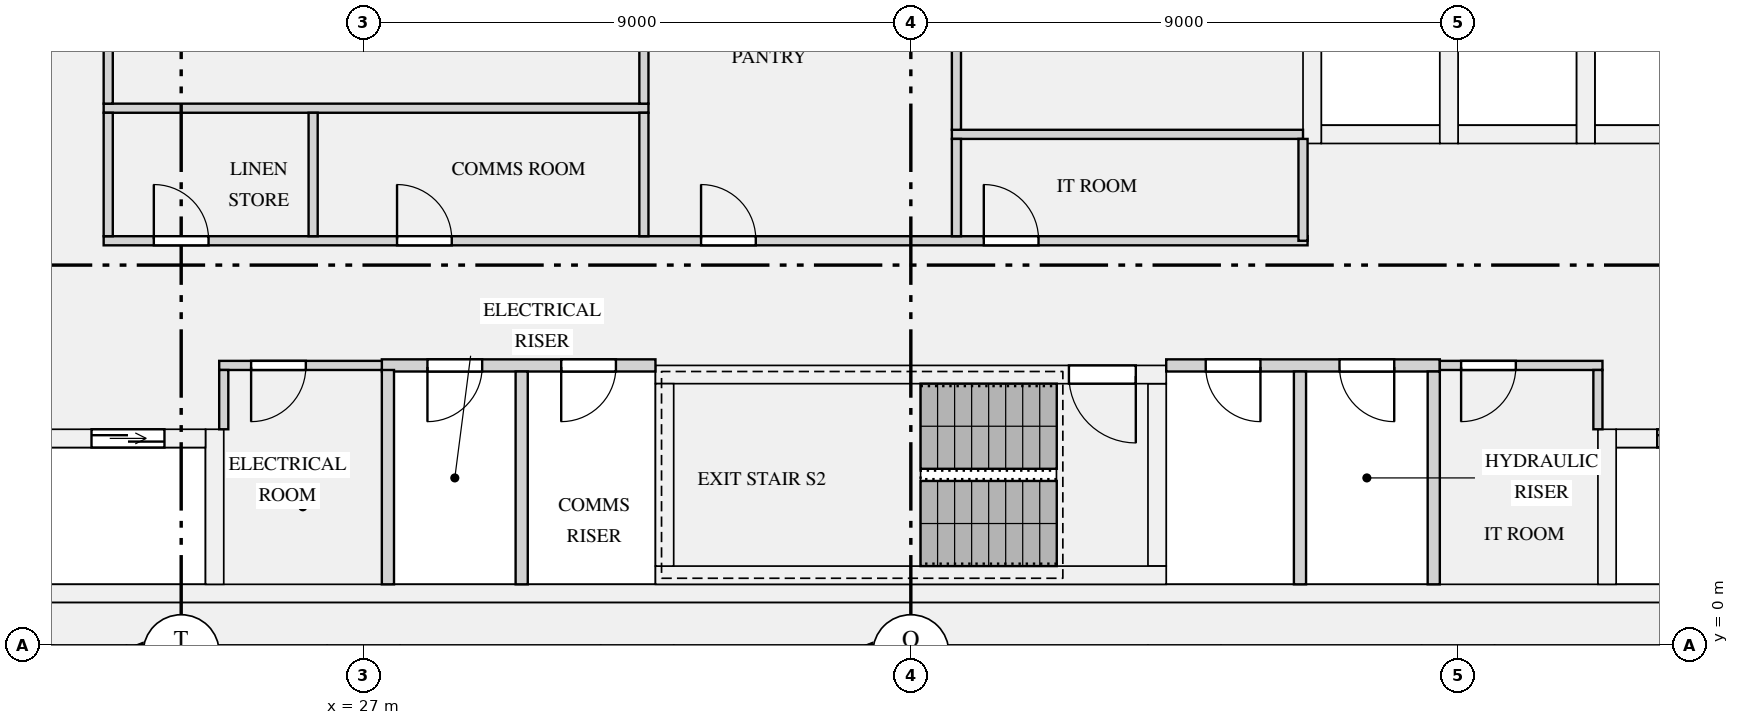
"""IFC4 building model, lengths in metres.
Left out: names, types, materials, properties, quantities, classifications, styles, units other than length and angle.
Written with IfcOpenShell. Run it as: python <this file> out.ifc"""

import sys

from ifc_helpers import new_model, si_unit, direction, frame, frame_2d, origin, place, context, subcontext, project, spatial, rectangle, extrude, element, fill, save


model = new_model("IFC4")
c1 = context("Model", 3, precision=1e-05, world=origin(), true_north=direction((0.0, 1.0)))
c2 = subcontext(c1, "Body", "Model", "MODEL_VIEW")
j1 = project(units=[si_unit("LENGTHUNIT", "METRE"), si_unit("PLANEANGLEUNIT", "RADIAN")], contexts=[c1])
p1 = place(None, origin())
s1 = spatial("IfcSite", under=j1, at=p1, CompositionType="ELEMENT")
p2 = place(p1, origin())
s2 = spatial("IfcBuilding", under=s1, at=p2, CompositionType="ELEMENT")
p3 = place(p2, frame((0.0, 0.0, 150.75)))
s3 = spatial("IfcBuildingStorey", under=s2, at=p3, CompositionType="ELEMENT", Elevation=150.75)
p4 = place(p3, frame((18.7, 0.35, 0.0), z_axis=(0.0, 0.0, 1.0), x_axis=(1.0, 0.0, 0.0)))
e1 = element("IfcWall", 1, at=p4, inside=s3, PredefinedType="SHEAR", context=c2, shape_type="SweptSolid", body=[
    extrude(rectangle(XDim=34.6, YDim=0.7, at=frame_2d((17.3, 0.0))), origin(), (0.0, 0.0, 1.0), 3.15),
])
p5 = place(p3, frame((18.7, 0.85, 0.0), z_axis=(0.0, 0.0, 1.0), x_axis=(1.0, 0.0, 0.0)))
e2 = element("IfcWall", 2, at=p5, inside=s3, PredefinedType="SHEAR", context=c2, shape_type="SweptSolid", body=[
    extrude(rectangle(XDim=34.6, YDim=0.3, at=frame_2d((17.3, 0.0))), origin(), (0.0, 0.0, 1.0), 3.15),
])
p6 = place(p3, frame((42.75, 8.4, 0.0), z_axis=(0.0, 0.0, 1.0), x_axis=(1.0, 0.0, 0.0)))
e3 = element("IfcWall", 3, at=p6, inside=s3, PredefinedType="SHEAR", context=c2, shape_type="SweptSolid", body=[
    extrude(rectangle(XDim=1.95, YDim=0.3, at=frame_2d((0.975, 0.0))), origin(), (0.0, 0.0, 1.0), 3.15),
])
p7 = place(p3, frame((42.6, 8.25, 0.0), z_axis=(0.0, 0.0, 1.0), x_axis=(0.0, 1.0, 0.0)))
e4 = element("IfcWall", 4, at=p7, inside=s3, PredefinedType="SHEAR", context=c2, shape_type="SweptSolid", body=[
    extrude(rectangle(XDim=3.65, YDim=0.3, at=frame_2d((1.825, 0.0))), origin(), (0.0, 0.0, 1.0), 3.15),
])
p8 = place(p3, frame((45.0, 8.4, 0.0), z_axis=(0.0, 0.0, 1.0), x_axis=(1.0, 0.0, 0.0)))
e5 = element("IfcWall", 5, at=p8, inside=s3, PredefinedType="SHEAR", context=c2, shape_type="SweptSolid", body=[
    extrude(rectangle(XDim=1.95, YDim=0.3, at=frame_2d((0.975, 0.0))), origin(), (0.0, 0.0, 1.0), 3.15),
])
p9 = place(p3, frame((44.85, 8.25, 0.0), z_axis=(0.0, 0.0, 1.0), x_axis=(0.0, 1.0, 0.0)))
e6 = element("IfcWall", 6, at=p9, inside=s3, PredefinedType="SHEAR", context=c2, shape_type="SweptSolid", body=[
    extrude(rectangle(XDim=3.65, YDim=0.3, at=frame_2d((1.825, 0.0))), origin(), (0.0, 0.0, 1.0), 3.15),
])
p10 = place(p3, frame((47.25, 8.4, 0.0), z_axis=(0.0, 0.0, 1.0), x_axis=(1.0, 0.0, 0.0)))
e7 = element("IfcWall", 7, at=p10, inside=s3, PredefinedType="SHEAR", context=c2, shape_type="SweptSolid", body=[
    extrude(rectangle(XDim=1.95, YDim=0.3, at=frame_2d((0.975, 0.0))), origin(), (0.0, 0.0, 1.0), 3.15),
])
p11 = place(p3, frame((47.1, 8.25, 0.0), z_axis=(0.0, 0.0, 1.0), x_axis=(0.0, 1.0, 0.0)))
e8 = element("IfcWall", 8, at=p11, inside=s3, PredefinedType="SHEAR", context=c2, shape_type="SweptSolid", body=[
    extrude(rectangle(XDim=3.65, YDim=0.3, at=frame_2d((1.825, 0.0))), origin(), (0.0, 0.0, 1.0), 3.15),
])
p12 = place(p3, frame((21.85, 3.4, 0.0), z_axis=(0.0, 0.0, 1.0), x_axis=(1.0, 0.0, 0.0)))
e9 = element("IfcWall", 9, at=p12, inside=s3, PredefinedType="SHEAR", context=c2, shape_type="SweptSolid", body=[
    extrude(rectangle(XDim=2.55, YDim=0.3, at=frame_2d((1.275, 0.0))), origin(), (0.0, 0.0, 1.0), 3.15),
])
p13 = place(p12, frame((0.675, 0.0, 0.0)))
e10 = element("IfcOpeningElement", 10, at=p13, cuts=e9, PredefinedType="OPENING", context=c2, shape_type="SweptSolid", body=[
    extrude(rectangle(XDim=1.2, YDim=2.1, at=frame_2d((0.6, 1.05))), frame((0.0, 0.16, 0.0), z_axis=(0.0, -1.0, 0.0), x_axis=(1.0, 0.0, 0.0)), (0.0, 0.0, 1.0), 0.32),
])
p14 = place(p3, frame((24.55, 1.0, 0.0), z_axis=(0.0, 0.0, 1.0), x_axis=(0.0, 1.0, 0.0)))
e11 = element("IfcWall", 11, at=p14, inside=s3, PredefinedType="SHEAR", context=c2, shape_type="SweptSolid", body=[
    extrude(rectangle(XDim=2.55, YDim=0.3, at=frame_2d((1.275, 0.0))), origin(), (0.0, 0.0, 1.0), 3.15),
])
p15 = place(p3, frame((47.6, 3.4, 0.0), z_axis=(0.0, 0.0, 1.0), x_axis=(1.0, 0.0, 0.0)))
e12 = element("IfcWall", 12, at=p15, inside=s3, PredefinedType="SHEAR", context=c2, shape_type="SweptSolid", body=[
    extrude(rectangle(XDim=2.55, YDim=0.3, at=frame_2d((1.275, 0.0))), origin(), (0.0, 0.0, 1.0), 3.15),
])
p16 = place(p15, frame((0.675, 0.0, 0.0)))
e13 = element("IfcOpeningElement", 13, at=p16, cuts=e12, PredefinedType="OPENING", context=c2, shape_type="SweptSolid", body=[
    extrude(rectangle(XDim=1.2, YDim=2.1, at=frame_2d((0.6, 1.05))), frame((0.0, 0.16, 0.0), z_axis=(0.0, -1.0, 0.0), x_axis=(1.0, 0.0, 0.0)), (0.0, 0.0, 1.0), 0.32),
])
p17 = place(p3, frame((47.45, 1.0, 0.0), z_axis=(0.0, 0.0, 1.0), x_axis=(0.0, 1.0, 0.0)))
e14 = element("IfcWall", 14, at=p17, inside=s3, PredefinedType="SHEAR", context=c2, shape_type="SweptSolid", body=[
    extrude(rectangle(XDim=2.55, YDim=0.3, at=frame_2d((1.275, 0.0))), origin(), (0.0, 0.0, 1.0), 3.15),
])
p18 = place(p3, frame((31.8, 1.15, 0.0), z_axis=(0.0, 0.0, 1.0), x_axis=(1.0, 0.0, 0.0)))
e15 = element("IfcWall", 15, at=p18, inside=s3, PredefinedType="SHEAR", context=c2, shape_type="SweptSolid", body=[
    extrude(rectangle(XDim=8.4, YDim=0.3, at=frame_2d((4.2, 0.0))), origin(), (0.0, 0.0, 1.0), 3.15),
])
p19 = place(p3, frame((31.8, 4.45, 0.0), z_axis=(0.0, 0.0, 1.0), x_axis=(1.0, 0.0, 0.0)))
e16 = element("IfcWall", 16, at=p19, inside=s3, PredefinedType="SHEAR", context=c2, shape_type="SweptSolid", body=[
    extrude(rectangle(XDim=8.4, YDim=0.3, at=frame_2d((4.2, 0.0))), origin(), (0.0, 0.0, 1.0), 3.15),
])
p20 = place(p19, frame((6.8, 0.0, 0.0)))
e17 = element("IfcOpeningElement", 17, at=p20, cuts=e16, PredefinedType="OPENING", context=c2, shape_type="SweptSolid", body=[
    extrude(rectangle(XDim=1.1, YDim=2.1, at=frame_2d((0.55, 1.05))), frame((0.0, 0.16, 0.0), z_axis=(0.0, -1.0, 0.0), x_axis=(1.0, 0.0, 0.0)), (0.0, 0.0, 1.0), 0.32),
])
for number, where, z_axis, x_axis in (
    (18, (31.95, 1.3, 0.0), (0.0, 0.0, 1.0), (0.0, 1.0, 0.0)),
    (19, (40.05, 1.3, 0.0), (0.0, 0.0, 1.0), (0.0, 1.0, 0.0)),
):
    element("IfcWall", number, at=place(p3, frame(where, z_axis=z_axis, x_axis=x_axis)), inside=s3, PredefinedType="SHEAR", context=c2, shape_type="SweptSolid", body=[
        extrude(rectangle(XDim=3.0, YDim=0.3, at=frame_2d((1.5, 0.0))), origin(), (0.0, 0.0, 1.0), 3.15),
    ])
p21 = place(p3, frame((27.3, 4.6, 0.0), z_axis=(0.0, 0.0, 1.0), x_axis=(1.0, 0.0, 0.0)))
e20 = element("IfcWall", 20, at=p21, inside=s3, PredefinedType="PARTITIONING", context=c2, shape_type="SweptSolid", body=[
    extrude(rectangle(XDim=4.5, YDim=0.2, at=frame_2d((2.25, 0.0))), origin(), (0.0, 0.0, 1.0), 2.83),
])
p22 = place(p21, frame((0.75, 0.0, 0.0)))
e21 = element("IfcOpeningElement", 21, at=p22, cuts=e20, PredefinedType="OPENING", context=c2, shape_type="SweptSolid", body=[
    extrude(rectangle(XDim=0.9, YDim=2.1, at=frame_2d((0.45, 1.05))), frame((0.0, 0.11, 0.0), z_axis=(0.0, -1.0, 0.0), x_axis=(1.0, 0.0, 0.0)), (0.0, 0.0, 1.0), 0.22),
])
p23 = place(p21, frame((2.95, 0.0, 0.0)))
e22 = element("IfcOpeningElement", 22, at=p23, cuts=e20, PredefinedType="OPENING", context=c2, shape_type="SweptSolid", body=[
    extrude(rectangle(XDim=0.9, YDim=2.1, at=frame_2d((0.45, 1.05))), frame((0.0, 0.11, 0.0), z_axis=(0.0, -1.0, 0.0), x_axis=(1.0, 0.0, 0.0)), (0.0, 0.0, 1.0), 0.22),
])
p24 = place(p3, frame((40.2, 4.6, 0.0), z_axis=(0.0, 0.0, 1.0), x_axis=(1.0, 0.0, 0.0)))
e23 = element("IfcWall", 23, at=p24, inside=s3, PredefinedType="PARTITIONING", context=c2, shape_type="SweptSolid", body=[
    extrude(rectangle(XDim=4.5, YDim=0.2, at=frame_2d((2.25, 0.0))), origin(), (0.0, 0.0, 1.0), 2.83),
])
p25 = place(p24, frame((0.65, 0.0, 0.0)))
e24 = element("IfcOpeningElement", 24, at=p25, cuts=e23, PredefinedType="OPENING", context=c2, shape_type="SweptSolid", body=[
    extrude(rectangle(XDim=0.9, YDim=2.1, at=frame_2d((0.45, 1.05))), frame((0.0, 0.11, 0.0), z_axis=(0.0, -1.0, 0.0), x_axis=(1.0, 0.0, 0.0)), (0.0, 0.0, 1.0), 0.22),
])
p26 = place(p24, frame((2.85, 0.0, 0.0)))
e25 = element("IfcOpeningElement", 25, at=p26, cuts=e23, PredefinedType="OPENING", context=c2, shape_type="SweptSolid", body=[
    extrude(rectangle(XDim=0.9, YDim=2.1, at=frame_2d((0.45, 1.05))), frame((0.0, 0.11, 0.0), z_axis=(0.0, -1.0, 0.0), x_axis=(1.0, 0.0, 0.0)), (0.0, 0.0, 1.0), 0.22),
])
p27 = place(p3, frame((24.625, 4.6, 0.0), z_axis=(0.0, 0.0, 1.0), x_axis=(1.0, 0.0, 0.0)))
e26 = element("IfcWall", 26, at=p27, inside=s3, PredefinedType="PARTITIONING", context=c2, shape_type="SweptSolid", body=[
    extrude(rectangle(XDim=2.675, YDim=0.15, at=frame_2d((1.337, 0.0))), origin(), (0.0, 0.0, 1.0), 2.83),
])
p28 = place(p27, frame((0.525, 0.0, 0.0)))
e27 = element("IfcOpeningElement", 27, at=p28, cuts=e26, PredefinedType="OPENING", context=c2, shape_type="SweptSolid", body=[
    extrude(rectangle(XDim=0.9, YDim=2.1, at=frame_2d((0.45, 1.05))), frame((0.0, 0.085, 0.0), z_axis=(0.0, -1.0, 0.0), x_axis=(1.0, 0.0, 0.0)), (0.0, 0.0, 1.0), 0.17),
])
p29 = place(p3, frame((44.7, 4.6, 0.0), z_axis=(0.0, 0.0, 1.0), x_axis=(1.0, 0.0, 0.0)))
e28 = element("IfcWall", 28, at=p29, inside=s3, PredefinedType="PARTITIONING", context=c2, shape_type="SweptSolid", body=[
    extrude(rectangle(XDim=2.675, YDim=0.15, at=frame_2d((1.337, 0.0))), origin(), (0.0, 0.0, 1.0), 2.83),
])
p30 = place(p29, frame((0.35, 0.0, 0.0)))
e29 = element("IfcOpeningElement", 29, at=p30, cuts=e28, PredefinedType="OPENING", context=c2, shape_type="SweptSolid", body=[
    extrude(rectangle(XDim=0.9, YDim=2.1, at=frame_2d((0.45, 1.05))), frame((0.0, 0.085, 0.0), z_axis=(0.0, -1.0, 0.0), x_axis=(1.0, 0.0, 0.0)), (0.0, 0.0, 1.0), 0.17),
])
p31 = place(p3, frame((22.725, 6.65, 0.0), z_axis=(0.0, 0.0, 1.0), x_axis=(1.0, 0.0, 0.0)))
e30 = element("IfcWall", 30, at=p31, inside=s3, PredefinedType="PARTITIONING", context=c2, shape_type="SweptSolid", body=[
    extrude(rectangle(XDim=19.8, YDim=0.15, at=frame_2d((9.9, 0.0))), origin(), (0.0, 0.0, 1.0), 2.83),
])
p32 = place(p31, frame((0.825, 0.0, 0.0)))
e31 = element("IfcOpeningElement", 31, at=p32, cuts=e30, PredefinedType="OPENING", context=c2, shape_type="SweptSolid", body=[
    extrude(rectangle(XDim=0.9, YDim=2.1, at=frame_2d((0.45, 1.05))), frame((0.0, 0.085, 0.0), z_axis=(0.0, -1.0, 0.0), x_axis=(1.0, 0.0, 0.0)), (0.0, 0.0, 1.0), 0.17),
])
p33 = place(p31, frame((4.825, 0.0, 0.0)))
e32 = element("IfcOpeningElement", 32, at=p33, cuts=e30, PredefinedType="OPENING", context=c2, shape_type="SweptSolid", body=[
    extrude(rectangle(XDim=0.9, YDim=2.1, at=frame_2d((0.45, 1.05))), frame((0.0, 0.085, 0.0), z_axis=(0.0, -1.0, 0.0), x_axis=(1.0, 0.0, 0.0)), (0.0, 0.0, 1.0), 0.17),
])
p34 = place(p31, frame((9.825, 0.0, 0.0)))
e33 = element("IfcOpeningElement", 33, at=p34, cuts=e30, PredefinedType="OPENING", context=c2, shape_type="SweptSolid", body=[
    extrude(rectangle(XDim=0.9, YDim=2.1, at=frame_2d((0.45, 1.05))), frame((0.0, 0.085, 0.0), z_axis=(0.0, -1.0, 0.0), x_axis=(1.0, 0.0, 0.0)), (0.0, 0.0, 1.0), 0.17),
])
p35 = place(p31, frame((14.475, 0.0, 0.0)))
e34 = element("IfcOpeningElement", 34, at=p35, cuts=e30, PredefinedType="OPENING", context=c2, shape_type="SweptSolid", body=[
    extrude(rectangle(XDim=0.9, YDim=2.1, at=frame_2d((0.45, 1.05))), frame((0.0, 0.085, 0.0), z_axis=(0.0, -1.0, 0.0), x_axis=(1.0, 0.0, 0.0)), (0.0, 0.0, 1.0), 0.17),
])
p36 = place(p3, frame((36.675, 8.4, 0.0), z_axis=(0.0, 0.0, 1.0), x_axis=(1.0, 0.0, 0.0)))
e35 = element("IfcWall", 35, at=p36, inside=s3, PredefinedType="PARTITIONING", context=c2, shape_type="SweptSolid", body=[
    extrude(rectangle(XDim=5.775, YDim=0.15, at=frame_2d((2.887, 0.0))), origin(), (0.0, 0.0, 1.0), 2.83),
])
p37 = place(p3, frame((22.725, 8.83, 0.0), z_axis=(0.0, 0.0, 1.0), x_axis=(1.0, 0.0, 0.0)))
e36 = element("IfcWall", 36, at=p37, inside=s3, PredefinedType="PARTITIONING", context=c2, shape_type="SweptSolid", body=[
    extrude(rectangle(XDim=8.96, YDim=0.15, at=frame_2d((4.48, 0.0))), origin(), (0.0, 0.0, 1.0), 2.83),
])
p38 = place(p3, frame((27.4, 1.0, 0.0), z_axis=(0.0, 0.0, 1.0), x_axis=(0.0, 1.0, 0.0)))
e37 = element("IfcWall", 37, at=p38, inside=s3, PredefinedType="PARTITIONING", context=c2, shape_type="SweptSolid", body=[
    extrude(rectangle(XDim=3.525, YDim=0.2, at=frame_2d((1.762, 0.0))), origin(), (0.0, 0.0, 1.0), 2.83),
])
for number, where, z_axis, x_axis in (
    (38, (29.6, 1.0, 0.0), (0.0, 0.0, 1.0), (0.0, 1.0, 0.0)),
    (39, (42.4, 1.0, 0.0), (0.0, 0.0, 1.0), (0.0, 1.0, 0.0)),
    (40, (44.6, 1.0, 0.0), (0.0, 0.0, 1.0), (0.0, 1.0, 0.0)),
):
    element("IfcWall", number, at=place(p3, frame(where, z_axis=z_axis, x_axis=x_axis)), inside=s3, PredefinedType="PARTITIONING", context=c2, shape_type="SweptSolid", body=[
        extrude(rectangle(XDim=3.5, YDim=0.2, at=frame_2d((1.75, 0.0))), origin(), (0.0, 0.0, 1.0), 2.83),
    ])
for number, where, z_axis, x_axis in (
    (41, (24.7, 3.55, 0.0), (0.0, 0.0, 1.0), (0.0, 1.0, 0.0)),
    (42, (47.3, 3.55, 0.0), (0.0, 0.0, 1.0), (0.0, 1.0, 0.0)),
):
    element("IfcWall", number, at=place(p3, frame(where, z_axis=z_axis, x_axis=x_axis)), inside=s3, PredefinedType="PARTITIONING", context=c2, shape_type="SweptSolid", body=[
        extrude(rectangle(XDim=0.975, YDim=0.15, at=frame_2d((0.487, 0.0))), origin(), (0.0, 0.0, 1.0), 2.83),
    ])
p39 = place(p3, frame((42.45, 6.65, 0.0), z_axis=(0.0, 0.0, 1.0), x_axis=(0.0, 1.0, 0.0)))
e43 = element("IfcWall", 43, at=p39, inside=s3, PredefinedType="PARTITIONING", context=c2, shape_type="SweptSolid", body=[
    extrude(rectangle(XDim=1.675, YDim=0.15, at=frame_2d((0.837, 0.0))), origin(), (0.0, 0.0, 1.0), 2.83),
])
for number, where, z_axis, x_axis in (
    (44, (22.8, 6.725, 0.0), (0.0, 0.0, 1.0), (0.0, 1.0, 0.0)),
    (45, (26.17, 6.725, 0.0), (0.0, 0.0, 1.0), (0.0, 1.0, 0.0)),
    (46, (31.61, 6.725, 0.0), (0.0, 0.0, 1.0), (0.0, 1.0, 0.0)),
):
    element("IfcWall", number, at=place(p3, frame(where, z_axis=z_axis, x_axis=x_axis)), inside=s3, PredefinedType="PARTITIONING", context=c2, shape_type="SweptSolid", body=[
        extrude(rectangle(XDim=2.03, YDim=0.15, at=frame_2d((1.015, 0.0))), origin(), (0.0, 0.0, 1.0), 2.83),
    ])
p40 = place(p3, frame((36.75, 6.725, 0.0), z_axis=(0.0, 0.0, 1.0), x_axis=(0.0, 1.0, 0.0)))
e47 = element("IfcWall", 47, at=p40, inside=s3, PredefinedType="PARTITIONING", context=c2, shape_type="SweptSolid", body=[
    extrude(rectangle(XDim=1.6, YDim=0.15, at=frame_2d((0.8, 0.0))), origin(), (0.0, 0.0, 1.0), 2.83),
])
p41 = place(p3, frame((36.75, 8.475, 0.0), z_axis=(0.0, 0.0, 1.0), x_axis=(0.0, 1.0, 0.0)))
e48 = element("IfcWall", 48, at=p41, inside=s3, PredefinedType="PARTITIONING", context=c2, shape_type="SweptSolid", body=[
    extrude(rectangle(XDim=3.425, YDim=0.15, at=frame_2d((1.712, 0.0))), origin(), (0.0, 0.0, 1.0), 2.83),
])
for number, where, z_axis, x_axis in (
    (49, (22.8, 8.905, 0.0), (0.0, 0.0, 1.0), (0.0, 1.0, 0.0)),
    (50, (31.61, 8.905, 0.0), (0.0, 0.0, 1.0), (0.0, 1.0, 0.0)),
):
    element("IfcWall", number, at=place(p3, frame(where, z_axis=z_axis, x_axis=x_axis)), inside=s3, PredefinedType="PARTITIONING", context=c2, shape_type="SweptSolid", body=[
        extrude(rectangle(XDim=2.995, YDim=0.15, at=frame_2d((1.498, 0.0))), origin(), (0.0, 0.0, 1.0), 2.83),
    ])
p42 = place(p13, origin())
e51 = element("IfcDoor", 51, at=p42, inside=s3, OperationType="DOUBLE_DOOR_SLIDING", PredefinedType="DOOR", context=c2, shape_type="SweptSolid", body=[
    extrude(rectangle(XDim=1.2, YDim=2.1, at=frame_2d((0.6, 1.05))), frame((0.0, 0.025, 0.0), z_axis=(0.0, -1.0, 0.0), x_axis=(1.0, 0.0, 0.0)), (0.0, 0.0, 1.0), 0.05),
])
fill(e10, e51)
p43 = place(p16, origin())
e52 = element("IfcDoor", 52, at=p43, inside=s3, OperationType="DOUBLE_DOOR_SLIDING", PredefinedType="DOOR", context=c2, shape_type="SweptSolid", body=[
    extrude(rectangle(XDim=1.2, YDim=2.1, at=frame_2d((0.6, 1.05))), frame((0.0, 0.025, 0.0), z_axis=(0.0, -1.0, 0.0), x_axis=(1.0, 0.0, 0.0)), (0.0, 0.0, 1.0), 0.05),
])
fill(e13, e52)
p44 = place(p20, frame((1.1, 0.0, 0.0), z_axis=(0.0, 0.0, 1.0), x_axis=(-1.0, 0.0, 0.0)))
e53 = element("IfcDoor", 53, at=p44, inside=s3, OperationType="SINGLE_SWING_LEFT", PredefinedType="DOOR", context=c2, shape_type="SweptSolid", body=[
    extrude(rectangle(XDim=1.1, YDim=2.1, at=frame_2d((0.55, 1.05))), frame((0.0, 0.025, 0.0), z_axis=(0.0, -1.0, 0.0), x_axis=(1.0, 0.0, 0.0)), (0.0, 0.0, 1.0), 0.05),
])
fill(e17, e53)
p45 = place(p28, frame((0.9, 0.0, 0.0), z_axis=(0.0, 0.0, 1.0), x_axis=(-1.0, 0.0, 0.0)))
e54 = element("IfcDoor", 54, at=p45, inside=s3, OperationType="SINGLE_SWING_RIGHT", PredefinedType="DOOR", context=c2, shape_type="SweptSolid", body=[
    extrude(rectangle(XDim=0.9, YDim=2.1, at=frame_2d((0.45, 1.05))), frame((0.0, 0.025, 0.0), z_axis=(0.0, -1.0, 0.0), x_axis=(1.0, 0.0, 0.0)), (0.0, 0.0, 1.0), 0.05),
])
fill(e27, e54)
p46 = place(p30, frame((0.9, 0.0, 0.0), z_axis=(0.0, 0.0, 1.0), x_axis=(-1.0, 0.0, 0.0)))
e55 = element("IfcDoor", 55, at=p46, inside=s3, OperationType="SINGLE_SWING_RIGHT", PredefinedType="DOOR", context=c2, shape_type="SweptSolid", body=[
    extrude(rectangle(XDim=0.9, YDim=2.1, at=frame_2d((0.45, 1.05))), frame((0.0, 0.025, 0.0), z_axis=(0.0, -1.0, 0.0), x_axis=(1.0, 0.0, 0.0)), (0.0, 0.0, 1.0), 0.05),
])
fill(e29, e55)
p47 = place(p32, origin())
e56 = element("IfcDoor", 56, at=p47, inside=s3, OperationType="SINGLE_SWING_LEFT", PredefinedType="DOOR", context=c2, shape_type="SweptSolid", body=[
    extrude(rectangle(XDim=0.9, YDim=2.1, at=frame_2d((0.45, 1.05))), frame((0.0, 0.025, 0.0), z_axis=(0.0, -1.0, 0.0), x_axis=(1.0, 0.0, 0.0)), (0.0, 0.0, 1.0), 0.05),
])
fill(e31, e56)
p48 = place(p33, origin())
e57 = element("IfcDoor", 57, at=p48, inside=s3, OperationType="SINGLE_SWING_LEFT", PredefinedType="DOOR", context=c2, shape_type="SweptSolid", body=[
    extrude(rectangle(XDim=0.9, YDim=2.1, at=frame_2d((0.45, 1.05))), frame((0.0, 0.025, 0.0), z_axis=(0.0, -1.0, 0.0), x_axis=(1.0, 0.0, 0.0)), (0.0, 0.0, 1.0), 0.05),
])
fill(e32, e57)
p49 = place(p34, origin())
e58 = element("IfcDoor", 58, at=p49, inside=s3, OperationType="SINGLE_SWING_LEFT", PredefinedType="DOOR", context=c2, shape_type="SweptSolid", body=[
    extrude(rectangle(XDim=0.9, YDim=2.1, at=frame_2d((0.45, 1.05))), frame((0.0, 0.025, 0.0), z_axis=(0.0, -1.0, 0.0), x_axis=(1.0, 0.0, 0.0)), (0.0, 0.0, 1.0), 0.05),
])
fill(e33, e58)
p50 = place(p35, origin())
e59 = element("IfcDoor", 59, at=p50, inside=s3, OperationType="SINGLE_SWING_LEFT", PredefinedType="DOOR", context=c2, shape_type="SweptSolid", body=[
    extrude(rectangle(XDim=0.9, YDim=2.1, at=frame_2d((0.45, 1.05))), frame((0.0, 0.025, 0.0), z_axis=(0.0, -1.0, 0.0), x_axis=(1.0, 0.0, 0.0)), (0.0, 0.0, 1.0), 0.05),
])
fill(e34, e59)
p51 = place(p22, frame((0.9, 0.0, 0.0), z_axis=(0.0, 0.0, 1.0), x_axis=(-1.0, 0.0, 0.0)))
e60 = element("IfcDoor", 60, at=p51, inside=s3, OperationType="SINGLE_SWING_RIGHT", PredefinedType="DOOR", context=c2, shape_type="SweptSolid", body=[
    extrude(rectangle(XDim=0.9, YDim=2.1, at=frame_2d((0.45, 1.05))), frame((0.0, 0.025, 0.0), z_axis=(0.0, -1.0, 0.0), x_axis=(1.0, 0.0, 0.0)), (0.0, 0.0, 1.0), 0.05),
])
fill(e21, e60)
p52 = place(p23, frame((0.9, 0.0, 0.0), z_axis=(0.0, 0.0, 1.0), x_axis=(-1.0, 0.0, 0.0)))
e61 = element("IfcDoor", 61, at=p52, inside=s3, OperationType="SINGLE_SWING_RIGHT", PredefinedType="DOOR", context=c2, shape_type="SweptSolid", body=[
    extrude(rectangle(XDim=0.9, YDim=2.1, at=frame_2d((0.45, 1.05))), frame((0.0, 0.025, 0.0), z_axis=(0.0, -1.0, 0.0), x_axis=(1.0, 0.0, 0.0)), (0.0, 0.0, 1.0), 0.05),
])
fill(e22, e61)
p53 = place(p25, frame((0.9, 0.0, 0.0), z_axis=(0.0, 0.0, 1.0), x_axis=(-1.0, 0.0, 0.0)))
e62 = element("IfcDoor", 62, at=p53, inside=s3, OperationType="SINGLE_SWING_LEFT", PredefinedType="DOOR", context=c2, shape_type="SweptSolid", body=[
    extrude(rectangle(XDim=0.9, YDim=2.1, at=frame_2d((0.45, 1.05))), frame((0.0, 0.025, 0.0), z_axis=(0.0, -1.0, 0.0), x_axis=(1.0, 0.0, 0.0)), (0.0, 0.0, 1.0), 0.05),
])
fill(e24, e62)
p54 = place(p26, frame((0.9, 0.0, 0.0), z_axis=(0.0, 0.0, 1.0), x_axis=(-1.0, 0.0, 0.0)))
e63 = element("IfcDoor", 63, at=p54, inside=s3, OperationType="SINGLE_SWING_LEFT", PredefinedType="DOOR", context=c2, shape_type="SweptSolid", body=[
    extrude(rectangle(XDim=0.9, YDim=2.1, at=frame_2d((0.45, 1.05))), frame((0.0, 0.025, 0.0), z_axis=(0.0, -1.0, 0.0), x_axis=(1.0, 0.0, 0.0)), (0.0, 0.0, 1.0), 0.05),
])
fill(e25, e63)
save(model, sys.argv[1])
